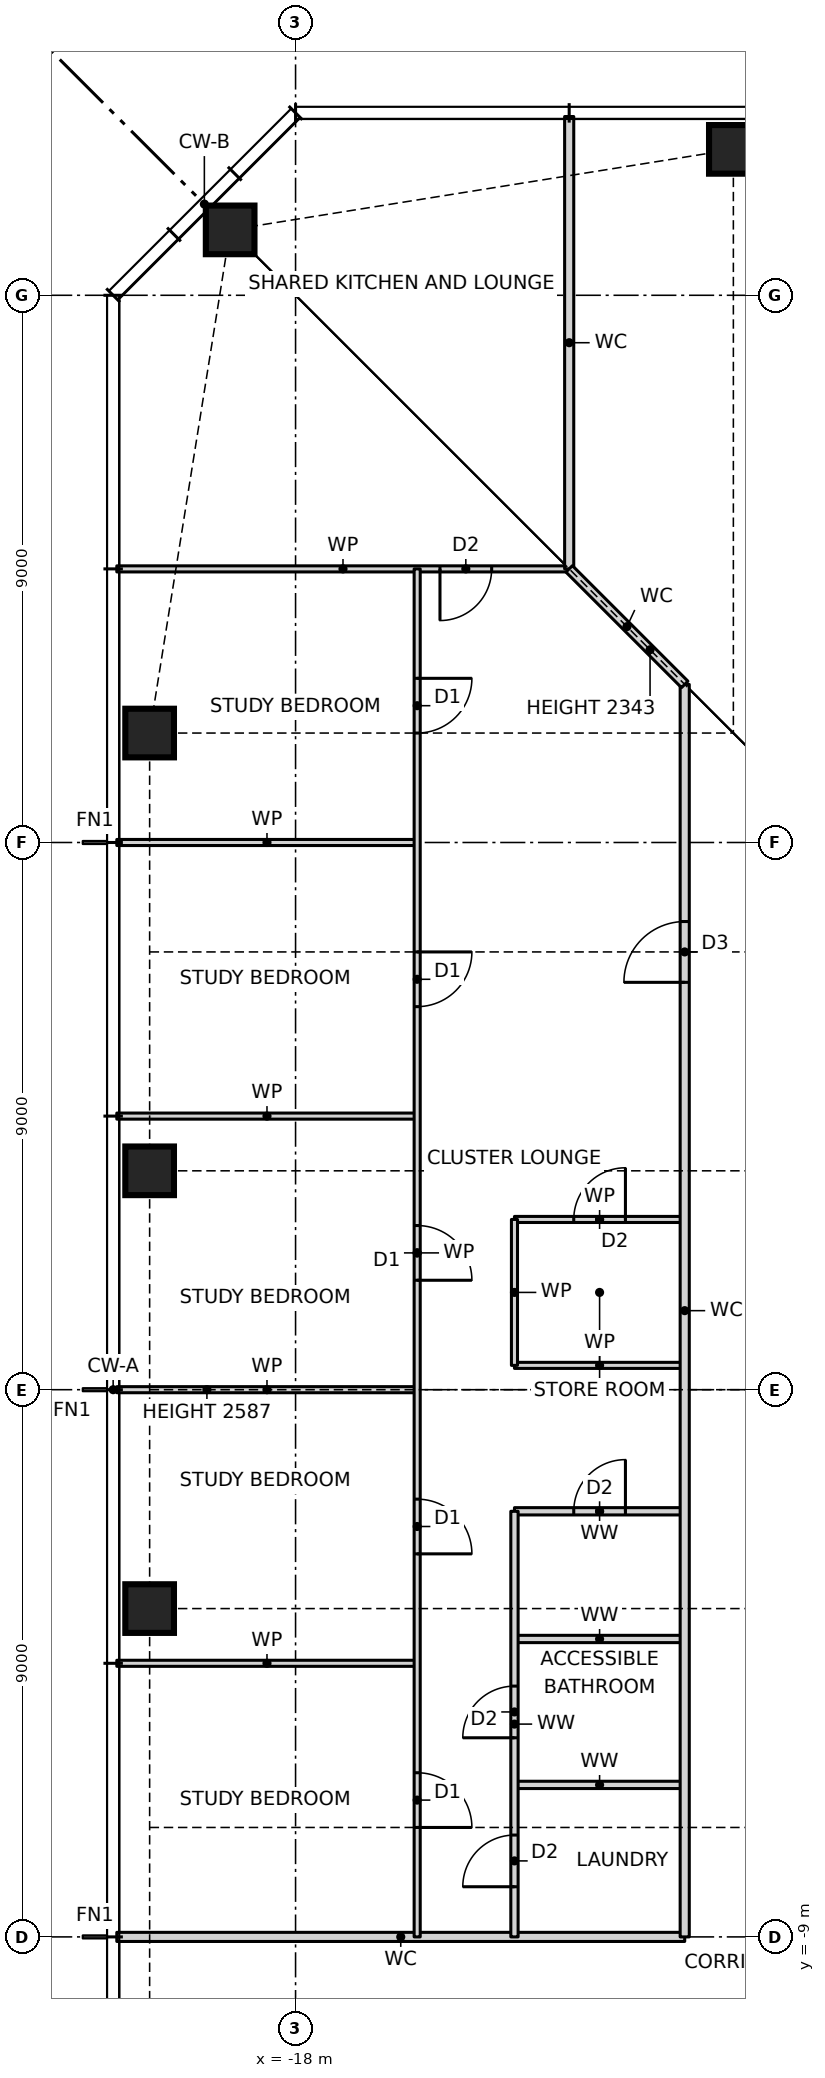
"""IFC4 building model, lengths in metres.
Left out: names, types, materials, properties, quantities, classifications, styles, units other than length and angle.
Written with IfcOpenShell. Run it as: python <this file> out.ifc"""

import sys

from ifc_helpers import new_model, si_unit, direction, frame, frame_2d, origin, origin_2d, place, context, subcontext, project, spatial, rectangle, hollow_rectangle, extrude, element, fill, save


model = new_model("IFC4")
c1 = context("Model", 3, precision=1e-05, world=origin(), true_north=direction((0.0, 1.0)))
c2 = subcontext(c1, "Body", "Model", "MODEL_VIEW")
j1 = project(units=[si_unit("LENGTHUNIT", "METRE"), si_unit("PLANEANGLEUNIT", "RADIAN")], contexts=[c1])
p1 = place(None, origin())
s1 = spatial("IfcSite", under=j1, at=p1, CompositionType="ELEMENT")
p2 = place(p1, origin())
s2 = spatial("IfcBuilding", under=s1, at=p2, CompositionType="ELEMENT")
p3 = place(p2, frame((0.0, 0.0, 91.0)))
s3 = spatial("IfcBuildingStorey", under=s2, at=p3, CompositionType="ELEMENT", Elevation=91.0)
for number, where, z_axis, x_axis in (
    (1, (-10.8, 20.4, 0.0), (0.0, 0.0, 1.0), (1.0, 0.0, 0.0)),
    (2, (-19.076, 19.076, 0.0), (0.0, 0.0, 1.0), (1.0, 0.0, 0.0)),
    (3, (-20.4, 10.8, 0.0), (0.0, 0.0, 1.0), (1.0, 0.0, 0.0)),
    (4, (-20.4, 3.6, 0.0), (0.0, 0.0, 1.0), (1.0, 0.0, 0.0)),
    (5, (-20.4, -3.6, 0.0), (0.0, 0.0, 1.0), (1.0, 0.0, 0.0)),
):
    element("IfcColumn", number, at=place(p3, frame(where, z_axis=z_axis, x_axis=x_axis)), inside=s3, PredefinedType="COLUMN", context=c2, shape_type="SweptSolid", body=[
        extrude(hollow_rectangle(XDim=0.8, YDim=0.8, WallThickness=0.07, at=origin_2d()), origin(), (0.0, 0.0, 1.0), 3.5),
    ])
p4 = place(p3, frame((-20.94, -9.0, 0.0), z_axis=(0.0, 0.0, 1.0), x_axis=(1.0, 0.0, 0.0)))
e6 = element("IfcWall", 6, at=p4, inside=s3, PredefinedType="PARTITIONING", context=c2, shape_type="SweptSolid", body=[
    extrude(rectangle(XDim=9.34, YDim=0.15, at=frame_2d((4.67, 0.0))), origin(), (0.0, 0.0, 1.0), 3.27),
])
p5 = place(p3, frame((-14.4, -6.5, 0.0), z_axis=(0.0, 0.0, 1.0), x_axis=(1.0, 0.0, 0.0)))
e7 = element("IfcWall", 7, at=p5, inside=s3, PredefinedType="PARTITIONING", context=c2, shape_type="SweptSolid", body=[
    extrude(rectangle(XDim=2.8, YDim=0.12, at=frame_2d((1.4, 0.0))), origin(), (0.0, 0.0, 1.0), 3.27),
])
p6 = place(p3, frame((-20.94, -4.5, 0.0), z_axis=(0.0, 0.0, 1.0), x_axis=(1.0, 0.0, 0.0)))
e8 = element("IfcWall", 8, at=p6, inside=s3, PredefinedType="PARTITIONING", context=c2, shape_type="SweptSolid", body=[
    extrude(rectangle(XDim=4.94, YDim=0.1, at=frame_2d((2.47, 0.0))), origin(), (0.0, 0.0, 1.0), 3.27),
])
p7 = place(p3, frame((-14.4, -4.1, 0.0), z_axis=(0.0, 0.0, 1.0), x_axis=(1.0, 0.0, 0.0)))
e9 = element("IfcWall", 9, at=p7, inside=s3, PredefinedType="PARTITIONING", context=c2, shape_type="SweptSolid", body=[
    extrude(rectangle(XDim=2.8, YDim=0.12, at=frame_2d((1.4, 0.0))), origin(), (0.0, 0.0, 1.0), 3.27),
])
p8 = place(p3, frame((-14.4, -2.0, 0.0), z_axis=(0.0, 0.0, 1.0), x_axis=(1.0, 0.0, 0.0)))
e10 = element("IfcWall", 10, at=p8, inside=s3, PredefinedType="PARTITIONING", context=c2, shape_type="SweptSolid", body=[
    extrude(rectangle(XDim=2.8, YDim=0.12, at=frame_2d((1.4, 0.0))), origin(), (0.0, 0.0, 1.0), 3.27),
])
p9 = place(p8, frame((0.975, 0.0, 0.0)))
e11 = element("IfcOpeningElement", 11, at=p9, cuts=e10, PredefinedType="OPENING", context=c2, shape_type="SweptSolid", body=[
    extrude(rectangle(XDim=0.85, YDim=2.1, at=frame_2d((0.425, 1.05))), frame((0.0, 0.07, 0.0), z_axis=(0.0, -1.0, 0.0), x_axis=(1.0, 0.0, 0.0)), (0.0, 0.0, 1.0), 0.14),
])
p10 = place(p3, frame((-20.94, 0.0, 0.0), z_axis=(0.0, 0.0, 1.0), x_axis=(1.0, 0.0, 0.0)))
e12 = element("IfcWall", 12, at=p10, inside=s3, PredefinedType="PARTITIONING", context=c2, shape_type="SweptSolid", body=[
    extrude(rectangle(XDim=4.94, YDim=0.1, at=frame_2d((2.47, 0.0))), origin(), (0.0, 0.0, 1.0), 2.587),
])
p11 = place(p3, frame((-14.4, 0.4, 0.0), z_axis=(0.0, 0.0, 1.0), x_axis=(1.0, 0.0, 0.0)))
e13 = element("IfcWall", 13, at=p11, inside=s3, PredefinedType="PARTITIONING", context=c2, shape_type="SweptSolid", body=[
    extrude(rectangle(XDim=2.8, YDim=0.1, at=frame_2d((1.4, 0.0))), origin(), (0.0, 0.0, 1.0), 3.27),
])
p12 = place(p3, frame((-14.4, 2.8, 0.0), z_axis=(0.0, 0.0, 1.0), x_axis=(1.0, 0.0, 0.0)))
e14 = element("IfcWall", 14, at=p12, inside=s3, PredefinedType="PARTITIONING", context=c2, shape_type="SweptSolid", body=[
    extrude(rectangle(XDim=2.8, YDim=0.1, at=frame_2d((1.4, 0.0))), origin(), (0.0, 0.0, 1.0), 3.27),
])
p13 = place(p12, frame((0.975, 0.0, 0.0)))
e15 = element("IfcOpeningElement", 15, at=p13, cuts=e14, PredefinedType="OPENING", context=c2, shape_type="SweptSolid", body=[
    extrude(rectangle(XDim=0.85, YDim=2.1, at=frame_2d((0.425, 1.05))), frame((0.0, 0.06, 0.0), z_axis=(0.0, -1.0, 0.0), x_axis=(1.0, 0.0, 0.0)), (0.0, 0.0, 1.0), 0.12),
])
for number, where, z_axis, x_axis in (
    (16, (-20.94, 4.5, 0.0), (0.0, 0.0, 1.0), (1.0, 0.0, 0.0)),
    (17, (-20.94, 9.0, 0.0), (0.0, 0.0, 1.0), (1.0, 0.0, 0.0)),
):
    element("IfcWall", number, at=place(p3, frame(where, z_axis=z_axis, x_axis=x_axis)), inside=s3, PredefinedType="PARTITIONING", context=c2, shape_type="SweptSolid", body=[
        extrude(rectangle(XDim=4.94, YDim=0.1, at=frame_2d((2.47, 0.0))), origin(), (0.0, 0.0, 1.0), 3.27),
    ])
p14 = place(p3, frame((-20.94, 13.5, 0.0), z_axis=(0.0, 0.0, 1.0), x_axis=(1.0, 0.0, 0.0)))
e18 = element("IfcWall", 18, at=p14, inside=s3, PredefinedType="PARTITIONING", context=c2, shape_type="SweptSolid", body=[
    extrude(rectangle(XDim=7.44, YDim=0.1, at=frame_2d((3.72, 0.0))), origin(), (0.0, 0.0, 1.0), 3.27),
])
p15 = place(p14, frame((5.315, 0.0, 0.0)))
e19 = element("IfcOpeningElement", 19, at=p15, cuts=e18, PredefinedType="OPENING", context=c2, shape_type="SweptSolid", body=[
    extrude(rectangle(XDim=0.85, YDim=2.1, at=frame_2d((0.425, 1.05))), frame((0.0, 0.06, 0.0), z_axis=(0.0, -1.0, 0.0), x_axis=(1.0, 0.0, 0.0)), (0.0, 0.0, 1.0), 0.12),
])
p16 = place(p3, frame((-11.6, -9.0, 0.0), z_axis=(0.0, 0.0, 1.0), x_axis=(0.0, 1.0, 0.0)))
e20 = element("IfcWall", 20, at=p16, inside=s3, PredefinedType="PARTITIONING", context=c2, shape_type="SweptSolid", body=[
    extrude(rectangle(XDim=20.6, YDim=0.15, at=frame_2d((10.3, 0.0))), origin(), (0.0, 0.0, 1.0), 3.27),
])
p17 = place(p16, frame((15.7, 0.0, 0.0)))
e21 = element("IfcOpeningElement", 21, at=p17, cuts=e20, PredefinedType="OPENING", context=c2, shape_type="SweptSolid", body=[
    extrude(rectangle(XDim=1.0, YDim=2.1, at=frame_2d((0.5, 1.05))), frame((0.0, 0.085, 0.0), z_axis=(0.0, -1.0, 0.0), x_axis=(1.0, 0.0, 0.0)), (0.0, 0.0, 1.0), 0.17),
])
p18 = place(p3, frame((-13.5, 13.5, 0.0), z_axis=(0.0, 0.0, 1.0), x_axis=(0.0, 1.0, 0.0)))
e22 = element("IfcWall", 22, at=p18, inside=s3, PredefinedType="PARTITIONING", context=c2, shape_type="SweptSolid", body=[
    extrude(rectangle(XDim=7.44, YDim=0.15, at=frame_2d((3.72, 0.0))), origin(), (0.0, 0.0, 1.0), 3.27),
])
p19 = place(p3, frame((-14.4, -9.0, 0.0), z_axis=(0.0, 0.0, 1.0), x_axis=(0.0, 1.0, 0.0)))
e23 = element("IfcWall", 23, at=p19, inside=s3, PredefinedType="PARTITIONING", context=c2, shape_type="SweptSolid", body=[
    extrude(rectangle(XDim=7.0, YDim=0.12, at=frame_2d((3.5, 0.0))), origin(), (0.0, 0.0, 1.0), 3.27),
])
p20 = place(p19, frame((3.275, 0.0, 0.0)))
e24 = element("IfcOpeningElement", 24, at=p20, cuts=e23, PredefinedType="OPENING", context=c2, shape_type="SweptSolid", body=[
    extrude(rectangle(XDim=0.85, YDim=2.1, at=frame_2d((0.425, 1.05))), frame((0.0, 0.07, 0.0), z_axis=(0.0, -1.0, 0.0), x_axis=(1.0, 0.0, 0.0)), (0.0, 0.0, 1.0), 0.14),
])
p21 = place(p19, frame((0.825, 0.0, 0.0)))
e25 = element("IfcOpeningElement", 25, at=p21, cuts=e23, PredefinedType="OPENING", context=c2, shape_type="SweptSolid", body=[
    extrude(rectangle(XDim=0.85, YDim=2.1, at=frame_2d((0.425, 1.05))), frame((0.0, 0.07, 0.0), z_axis=(0.0, -1.0, 0.0), x_axis=(1.0, 0.0, 0.0)), (0.0, 0.0, 1.0), 0.14),
])
p22 = place(p3, frame((-14.4, 0.4, 0.0), z_axis=(0.0, 0.0, 1.0), x_axis=(0.0, 1.0, 0.0)))
e26 = element("IfcWall", 26, at=p22, inside=s3, PredefinedType="PARTITIONING", context=c2, shape_type="SweptSolid", body=[
    extrude(rectangle(XDim=2.4, YDim=0.1, at=frame_2d((1.2, 0.0))), origin(), (0.0, 0.0, 1.0), 3.27),
])
p23 = place(p3, frame((-16.0, -9.0, 0.0), z_axis=(0.0, 0.0, 1.0), x_axis=(0.0, 1.0, 0.0)))
e27 = element("IfcWall", 27, at=p23, inside=s3, PredefinedType="PARTITIONING", context=c2, shape_type="SweptSolid", body=[
    extrude(rectangle(XDim=22.5, YDim=0.1, at=frame_2d((11.25, 0.0))), origin(), (0.0, 0.0, 1.0), 3.27),
])
p24 = place(p23, frame((19.8, 0.0, 0.0)))
e28 = element("IfcOpeningElement", 28, at=p24, cuts=e27, PredefinedType="OPENING", context=c2, shape_type="SweptSolid", body=[
    extrude(rectangle(XDim=0.9, YDim=2.1, at=frame_2d((0.45, 1.05))), frame((0.0, 0.06, 0.0), z_axis=(0.0, -1.0, 0.0), x_axis=(1.0, 0.0, 0.0)), (0.0, 0.0, 1.0), 0.12),
])
p25 = place(p23, frame((15.3, 0.0, 0.0)))
e29 = element("IfcOpeningElement", 29, at=p25, cuts=e27, PredefinedType="OPENING", context=c2, shape_type="SweptSolid", body=[
    extrude(rectangle(XDim=0.9, YDim=2.1, at=frame_2d((0.45, 1.05))), frame((0.0, 0.06, 0.0), z_axis=(0.0, -1.0, 0.0), x_axis=(1.0, 0.0, 0.0)), (0.0, 0.0, 1.0), 0.12),
])
p26 = place(p23, frame((10.8, 0.0, 0.0)))
e30 = element("IfcOpeningElement", 30, at=p26, cuts=e27, PredefinedType="OPENING", context=c2, shape_type="SweptSolid", body=[
    extrude(rectangle(XDim=0.9, YDim=2.1, at=frame_2d((0.45, 1.05))), frame((0.0, 0.06, 0.0), z_axis=(0.0, -1.0, 0.0), x_axis=(1.0, 0.0, 0.0)), (0.0, 0.0, 1.0), 0.12),
])
p27 = place(p23, frame((6.3, 0.0, 0.0)))
e31 = element("IfcOpeningElement", 31, at=p27, cuts=e27, PredefinedType="OPENING", context=c2, shape_type="SweptSolid", body=[
    extrude(rectangle(XDim=0.9, YDim=2.1, at=frame_2d((0.45, 1.05))), frame((0.0, 0.06, 0.0), z_axis=(0.0, -1.0, 0.0), x_axis=(1.0, 0.0, 0.0)), (0.0, 0.0, 1.0), 0.12),
])
p28 = place(p23, frame((1.8, 0.0, 0.0)))
e32 = element("IfcOpeningElement", 32, at=p28, cuts=e27, PredefinedType="OPENING", context=c2, shape_type="SweptSolid", body=[
    extrude(rectangle(XDim=0.9, YDim=2.1, at=frame_2d((0.45, 1.05))), frame((0.0, 0.06, 0.0), z_axis=(0.0, -1.0, 0.0), x_axis=(1.0, 0.0, 0.0)), (0.0, 0.0, 1.0), 0.12),
])
p29 = place(p3, frame((-11.6, 11.6, 0.0), z_axis=(0.0, 0.0, 1.0), x_axis=(-0.707106781187, 0.707106781187, 0.0)))
e33 = element("IfcWall", 33, at=p29, inside=s3, PredefinedType="PARTITIONING", context=c2, shape_type="SweptSolid", body=[
    extrude(rectangle(XDim=2.687, YDim=0.15, at=frame_2d((1.343, 0.0))), origin(), (0.0, 0.0, 1.0), 2.343),
])
p30 = place(p24, frame((0.9, 0.0, 0.0), z_axis=(0.0, 0.0, 1.0), x_axis=(-1.0, 0.0, 0.0)))
e34 = element("IfcDoor", 34, at=p30, inside=s3, OperationType="SINGLE_SWING_LEFT", PredefinedType="DOOR", context=c2, shape_type="SweptSolid", body=[
    extrude(rectangle(XDim=0.9, YDim=2.1, at=frame_2d((0.45, 1.05))), frame((0.0, 0.025, 0.0), z_axis=(0.0, -1.0, 0.0), x_axis=(1.0, 0.0, 0.0)), (0.0, 0.0, 1.0), 0.05),
])
fill(e28, e34)
p31 = place(p25, frame((0.9, 0.0, 0.0), z_axis=(0.0, 0.0, 1.0), x_axis=(-1.0, 0.0, 0.0)))
e35 = element("IfcDoor", 35, at=p31, inside=s3, OperationType="SINGLE_SWING_LEFT", PredefinedType="DOOR", context=c2, shape_type="SweptSolid", body=[
    extrude(rectangle(XDim=0.9, YDim=2.1, at=frame_2d((0.45, 1.05))), frame((0.0, 0.025, 0.0), z_axis=(0.0, -1.0, 0.0), x_axis=(1.0, 0.0, 0.0)), (0.0, 0.0, 1.0), 0.05),
])
fill(e29, e35)
p32 = place(p26, frame((0.9, 0.0, 0.0), z_axis=(0.0, 0.0, 1.0), x_axis=(-1.0, 0.0, 0.0)))
e36 = element("IfcDoor", 36, at=p32, inside=s3, OperationType="SINGLE_SWING_RIGHT", PredefinedType="DOOR", context=c2, shape_type="SweptSolid", body=[
    extrude(rectangle(XDim=0.9, YDim=2.1, at=frame_2d((0.45, 1.05))), frame((0.0, 0.025, 0.0), z_axis=(0.0, -1.0, 0.0), x_axis=(1.0, 0.0, 0.0)), (0.0, 0.0, 1.0), 0.05),
])
fill(e30, e36)
p33 = place(p27, frame((0.9, 0.0, 0.0), z_axis=(0.0, 0.0, 1.0), x_axis=(-1.0, 0.0, 0.0)))
e37 = element("IfcDoor", 37, at=p33, inside=s3, OperationType="SINGLE_SWING_RIGHT", PredefinedType="DOOR", context=c2, shape_type="SweptSolid", body=[
    extrude(rectangle(XDim=0.9, YDim=2.1, at=frame_2d((0.45, 1.05))), frame((0.0, 0.025, 0.0), z_axis=(0.0, -1.0, 0.0), x_axis=(1.0, 0.0, 0.0)), (0.0, 0.0, 1.0), 0.05),
])
fill(e31, e37)
p34 = place(p28, frame((0.9, 0.0, 0.0), z_axis=(0.0, 0.0, 1.0), x_axis=(-1.0, 0.0, 0.0)))
e38 = element("IfcDoor", 38, at=p34, inside=s3, OperationType="SINGLE_SWING_RIGHT", PredefinedType="DOOR", context=c2, shape_type="SweptSolid", body=[
    extrude(rectangle(XDim=0.9, YDim=2.1, at=frame_2d((0.45, 1.05))), frame((0.0, 0.025, 0.0), z_axis=(0.0, -1.0, 0.0), x_axis=(1.0, 0.0, 0.0)), (0.0, 0.0, 1.0), 0.05),
])
fill(e32, e38)
p35 = place(p17, origin())
e39 = element("IfcDoor", 39, at=p35, inside=s3, OperationType="SINGLE_SWING_LEFT", PredefinedType="DOOR", context=c2, shape_type="SweptSolid", body=[
    extrude(rectangle(XDim=1.0, YDim=2.1, at=frame_2d((0.5, 1.05))), frame((0.0, 0.025, 0.0), z_axis=(0.0, -1.0, 0.0), x_axis=(1.0, 0.0, 0.0)), (0.0, 0.0, 1.0), 0.05),
])
fill(e21, e39)
p36 = place(p13, origin())
e40 = element("IfcDoor", 40, at=p36, inside=s3, OperationType="SINGLE_SWING_RIGHT", PredefinedType="DOOR", context=c2, shape_type="SweptSolid", body=[
    extrude(rectangle(XDim=0.85, YDim=2.1, at=frame_2d((0.425, 1.05))), frame((0.0, 0.025, 0.0), z_axis=(0.0, -1.0, 0.0), x_axis=(1.0, 0.0, 0.0)), (0.0, 0.0, 1.0), 0.05),
])
fill(e15, e40)
p37 = place(p9, origin())
e41 = element("IfcDoor", 41, at=p37, inside=s3, OperationType="SINGLE_SWING_RIGHT", PredefinedType="DOOR", context=c2, shape_type="SweptSolid", body=[
    extrude(rectangle(XDim=0.85, YDim=2.1, at=frame_2d((0.425, 1.05))), frame((0.0, 0.025, 0.0), z_axis=(0.0, -1.0, 0.0), x_axis=(1.0, 0.0, 0.0)), (0.0, 0.0, 1.0), 0.05),
])
fill(e11, e41)
p38 = place(p20, origin())
e42 = element("IfcDoor", 42, at=p38, inside=s3, OperationType="SINGLE_SWING_LEFT", PredefinedType="DOOR", context=c2, shape_type="SweptSolid", body=[
    extrude(rectangle(XDim=0.85, YDim=2.1, at=frame_2d((0.425, 1.05))), frame((0.0, 0.025, 0.0), z_axis=(0.0, -1.0, 0.0), x_axis=(1.0, 0.0, 0.0)), (0.0, 0.0, 1.0), 0.05),
])
fill(e24, e42)
p39 = place(p21, origin())
e43 = element("IfcDoor", 43, at=p39, inside=s3, OperationType="SINGLE_SWING_LEFT", PredefinedType="DOOR", context=c2, shape_type="SweptSolid", body=[
    extrude(rectangle(XDim=0.85, YDim=2.1, at=frame_2d((0.425, 1.05))), frame((0.0, 0.025, 0.0), z_axis=(0.0, -1.0, 0.0), x_axis=(1.0, 0.0, 0.0)), (0.0, 0.0, 1.0), 0.05),
])
fill(e25, e43)
p40 = place(p15, frame((0.85, 0.0, 0.0), z_axis=(0.0, 0.0, 1.0), x_axis=(-1.0, 0.0, 0.0)))
e44 = element("IfcDoor", 44, at=p40, inside=s3, OperationType="SINGLE_SWING_RIGHT", PredefinedType="DOOR", context=c2, shape_type="SweptSolid", body=[
    extrude(rectangle(XDim=0.85, YDim=2.1, at=frame_2d((0.425, 1.05))), frame((0.0, 0.025, 0.0), z_axis=(0.0, -1.0, 0.0), x_axis=(1.0, 0.0, 0.0)), (0.0, 0.0, 1.0), 0.05),
])
fill(e19, e44)
save(model, sys.argv[1])
